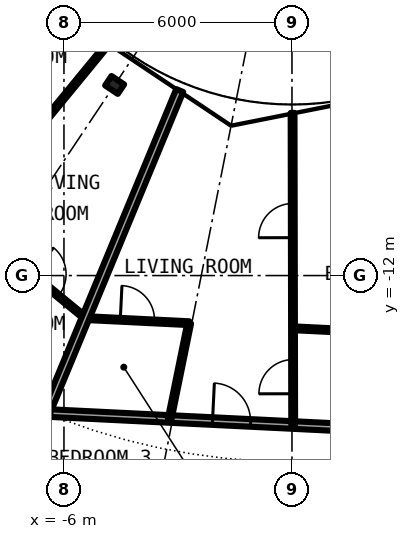
"""IFC4 building model, lengths in metres.
Left out: names, types, materials, properties, quantities, classifications, styles, units other than length and angle.
Written with IfcOpenShell. Run it as: python <this file> out.ifc"""

import sys

from ifc_helpers import new_model, si_unit, direction, frame, frame_2d, origin, origin_2d, place, context, subcontext, project, spatial, rectangle, i_section, extrude, element, fill, save


model = new_model("IFC4")
c1 = context("Model", 3, precision=1e-05, world=origin(), true_north=direction((0.0, 1.0)))
c2 = subcontext(c1, "Body", "Model", "MODEL_VIEW")
j1 = project(units=[si_unit("LENGTHUNIT", "METRE"), si_unit("PLANEANGLEUNIT", "RADIAN")], contexts=[c1])
p1 = place(None, origin())
s1 = spatial("IfcSite", under=j1, at=p1, CompositionType="ELEMENT")
p2 = place(p1, origin())
s2 = spatial("IfcBuilding", under=s1, at=p2, CompositionType="ELEMENT")
p3 = place(p2, frame((0.0, 0.0, 69.7)))
s3 = spatial("IfcBuildingStorey", under=s2, at=p3, CompositionType="ELEMENT", Elevation=69.7)
p4 = place(p3, frame((-4.667, -6.984, 0.0), z_axis=(0.0, 0.0, 1.0), x_axis=(-0.55557023302, -0.831469612303, 0.0)))
e1 = element("IfcColumn", 1, at=p4, inside=s3, PredefinedType="COLUMN", context=c2, shape_type="SweptSolid", body=[
    extrude(i_section(OverallWidth=0.3, OverallDepth=0.4, WebThickness=0.013, FlangeThickness=0.024, FilletRadius=0.027, at=origin_2d()), origin(), (0.0, 0.0, 1.0), 3.05),
])
p5 = place(p3, frame((0.0, -19.6, 0.0), z_axis=(0.0, 0.0, 1.0), x_axis=(0.956932298225, 0.290311172044, 0.0)))
e2 = element("IfcWall", 2, at=p5, inside=s3, PredefinedType="PARTITIONING", context=c2, shape_type="SweptSolid", body=[
    extrude(rectangle(XDim=11.219, YDim=0.2, at=frame_2d((5.61, 0.0))), origin(), (0.0, 0.0, 1.0), 2.38),
])
p6 = place(p5, frame((7.086, 0.0, 0.0)))
e3 = element("IfcOpeningElement", 3, at=p6, cuts=e2, PredefinedType="OPENING", context=c2, shape_type="SweptSolid", body=[
    extrude(rectangle(XDim=1.0, YDim=2.3, at=frame_2d((0.5, 1.15))), frame((0.0, 0.11, 0.0), z_axis=(0.0, -1.0, 0.0), x_axis=(1.0, 0.0, 0.0)), (0.0, 0.0, 1.0), 0.22),
])
p7 = place(p3, frame((-6.469, -15.614, 0.0), z_axis=(0.0, 0.0, 1.0), x_axis=(0.998798520108, -0.049005267363, 0.0)))
e4 = element("IfcWall", 4, at=p7, inside=s3, PredefinedType="PARTITIONING", context=c2, shape_type="SweptSolid", body=[
    extrude(rectangle(XDim=11.389, YDim=0.2, at=frame_2d((5.694, 0.0))), origin(), (0.0, 0.0, 1.0), 2.7),
])
p8 = place(p7, frame((4.383, 0.0, 0.0)))
e5 = element("IfcOpeningElement", 5, at=p8, cuts=e4, PredefinedType="OPENING", context=c2, shape_type="SweptSolid", body=[
    extrude(rectangle(XDim=1.0, YDim=2.3, at=frame_2d((0.5, 1.15))), frame((0.0, 0.11, 0.0), z_axis=(0.0, -1.0, 0.0), x_axis=(1.0, 0.0, 0.0)), (0.0, 0.0, 1.0), 0.22),
])
p9 = place(p3, frame((-7.558, -11.376, 0.0), z_axis=(0.0, 0.0, 1.0), x_axis=(0.773049907698, -0.634345205868, 0.0)))
e6 = element("IfcWall", 6, at=p9, inside=s3, PredefinedType="PARTITIONING", context=c2, shape_type="SweptSolid", body=[
    extrude(rectangle(XDim=2.748, YDim=0.1, at=frame_2d((1.374, 0.0))), origin(), (0.0, 0.0, 1.0), 2.7),
])
p10 = place(p9, frame((0.924, 0.0, 0.0)))
e7 = element("IfcOpeningElement", 7, at=p10, cuts=e6, PredefinedType="OPENING", context=c2, shape_type="SweptSolid", body=[
    extrude(rectangle(XDim=0.9, YDim=2.3, at=frame_2d((0.45, 1.15))), frame((0.0, 0.06, 0.0), z_axis=(0.0, -1.0, 0.0), x_axis=(1.0, 0.0, 0.0)), (0.0, 0.0, 1.0), 0.12),
])
p11 = place(p3, frame((-5.434, -13.119, 0.0), z_axis=(0.0, 0.0, 1.0), x_axis=(0.998796928508, -0.049037695739, 0.0)))
e8 = element("IfcWall", 8, at=p11, inside=s3, PredefinedType="PARTITIONING", context=c2, shape_type="SweptSolid", body=[
    extrude(rectangle(XDim=2.733, YDim=0.1, at=frame_2d((1.367, 0.0))), origin(), (0.0, 0.0, 1.0), 2.7),
])
p12 = place(p11, frame((0.917, 0.0, 0.0)))
e9 = element("IfcOpeningElement", 9, at=p12, cuts=e8, PredefinedType="OPENING", context=c2, shape_type="SweptSolid", body=[
    extrude(rectangle(XDim=0.9, YDim=2.3, at=frame_2d((0.45, 1.15))), frame((0.0, 0.06, 0.0), z_axis=(0.0, -1.0, 0.0), x_axis=(1.0, 0.0, 0.0)), (0.0, 0.0, 1.0), 0.12),
])
p13 = place(p3, frame((0.03, -13.387, 0.0), z_axis=(0.0, 0.0, 1.0), x_axis=(0.998798386358, -0.049007993321, 0.0)))
e10 = element("IfcWall", 10, at=p13, inside=s3, PredefinedType="PARTITIONING", context=c2, shape_type="SweptSolid", body=[
    extrude(rectangle(XDim=4.1, YDim=0.1, at=frame_2d((2.05, 0.0))), origin(), (0.0, 0.0, 1.0), 2.7),
])
p14 = place(p3, frame((-8.62, -10.504, 0.0), z_axis=(0.0, 0.0, 1.0), x_axis=(0.634539754242, 0.772890225249, 0.0)))
e11 = element("IfcWall", 11, at=p14, inside=s3, PredefinedType="PARTITIONING", context=c2, shape_type="SweptSolid", body=[
    extrude(rectangle(XDim=5.867, YDim=0.1, at=frame_2d((2.934, 0.0))), origin(), (0.0, 0.0, 1.0), 2.7),
])
p15 = place(p14, frame((2.484, 0.0, 0.0)))
e12 = element("IfcOpeningElement", 12, at=p15, cuts=e11, PredefinedType="OPENING", context=c2, shape_type="SweptSolid", body=[
    extrude(rectangle(XDim=0.9, YDim=2.3, at=frame_2d((0.45, 1.15))), frame((0.0, 0.06, 0.0), z_axis=(0.0, -1.0, 0.0), x_axis=(1.0, 0.0, 0.0)), (0.0, 0.0, 1.0), 0.12),
])
p16 = place(p3, frame((-6.467, -15.614, 0.0), z_axis=(0.0, 0.0, 1.0), x_axis=(0.382646942224, 0.923894646378, 0.0)))
e13 = element("IfcWall", 13, at=p16, inside=s3, PredefinedType="PARTITIONING", context=c2, shape_type="SweptSolid", body=[
    extrude(rectangle(XDim=9.181, YDim=0.2, at=frame_2d((4.59, 0.0))), origin(), (0.0, 0.0, 1.0), 2.7),
])
p17 = place(p3, frame((-3.218, -15.773, 0.0), z_axis=(0.0, 0.0, 1.0), x_axis=(0.199820523641, 0.979832515449, 0.0)))
e14 = element("IfcWall", 14, at=p17, inside=s3, PredefinedType="PARTITIONING", context=c2, shape_type="SweptSolid", body=[
    extrude(rectangle(XDim=2.572, YDim=0.1, at=frame_2d((1.286, 0.0))), origin(), (0.0, 0.0, 1.0), 2.7),
])
p18 = place(p3, frame((0.032, -15.933, 0.0), z_axis=(0.0, 0.0, 1.0), x_axis=(-0.0019321625, 0.999998133372, 0.0)))
e15 = element("IfcWall", 15, at=p18, inside=s3, PredefinedType="PARTITIONING", context=c2, shape_type="SweptSolid", body=[
    extrude(rectangle(XDim=8.213, YDim=0.1, at=frame_2d((4.106, 0.0))), origin(), (0.0, 0.0, 1.0), 2.7),
])
p19 = place(p18, frame((0.823, 0.0, 0.0)))
e16 = element("IfcOpeningElement", 16, at=p19, cuts=e15, PredefinedType="OPENING", context=c2, shape_type="SweptSolid", body=[
    extrude(rectangle(XDim=0.9, YDim=2.3, at=frame_2d((0.45, 1.15))), frame((0.0, 0.06, 0.0), z_axis=(0.0, -1.0, 0.0), x_axis=(1.0, 0.0, 0.0)), (0.0, 0.0, 1.0), 0.12),
])
p20 = place(p18, frame((4.93, 0.0, 0.0)))
e17 = element("IfcOpeningElement", 17, at=p20, cuts=e15, PredefinedType="OPENING", context=c2, shape_type="SweptSolid", body=[
    extrude(rectangle(XDim=0.9, YDim=2.3, at=frame_2d((0.45, 1.15))), frame((0.0, 0.06, 0.0), z_axis=(0.0, -1.0, 0.0), x_axis=(1.0, 0.0, 0.0)), (0.0, 0.0, 1.0), 0.12),
])
p21 = place(p10, origin())
e18 = element("IfcDoor", 18, at=p21, inside=s3, OperationType="SINGLE_SWING_LEFT", PredefinedType="DOOR", context=c2, shape_type="SweptSolid", body=[
    extrude(rectangle(XDim=0.9, YDim=2.3, at=frame_2d((0.45, 1.15))), frame((0.0, 0.025, 0.0), z_axis=(0.0, -1.0, 0.0), x_axis=(1.0, 0.0, 0.0)), (0.0, 0.0, 1.0), 0.05),
])
fill(e7, e18)
p22 = place(p8, origin())
e19 = element("IfcDoor", 19, at=p22, inside=s3, OperationType="SINGLE_SWING_LEFT", PredefinedType="DOOR", context=c2, shape_type="SweptSolid", body=[
    extrude(rectangle(XDim=1.0, YDim=2.3, at=frame_2d((0.5, 1.15))), frame((0.0, 0.025, 0.0), z_axis=(0.0, -1.0, 0.0), x_axis=(1.0, 0.0, 0.0)), (0.0, 0.0, 1.0), 0.05),
])
fill(e5, e19)
p23 = place(p12, origin())
e20 = element("IfcDoor", 20, at=p23, inside=s3, OperationType="SINGLE_SWING_LEFT", PredefinedType="DOOR", context=c2, shape_type="SweptSolid", body=[
    extrude(rectangle(XDim=0.9, YDim=2.3, at=frame_2d((0.45, 1.15))), frame((0.0, 0.025, 0.0), z_axis=(0.0, -1.0, 0.0), x_axis=(1.0, 0.0, 0.0)), (0.0, 0.0, 1.0), 0.05),
])
fill(e9, e20)
p24 = place(p19, origin())
e21 = element("IfcDoor", 21, at=p24, inside=s3, OperationType="SINGLE_SWING_LEFT", PredefinedType="DOOR", context=c2, shape_type="SweptSolid", body=[
    extrude(rectangle(XDim=0.9, YDim=2.3, at=frame_2d((0.45, 1.15))), frame((0.0, 0.025, 0.0), z_axis=(0.0, -1.0, 0.0), x_axis=(1.0, 0.0, 0.0)), (0.0, 0.0, 1.0), 0.05),
])
fill(e16, e21)
p25 = place(p20, origin())
e22 = element("IfcDoor", 22, at=p25, inside=s3, OperationType="SINGLE_SWING_RIGHT", PredefinedType="DOOR", context=c2, shape_type="SweptSolid", body=[
    extrude(rectangle(XDim=0.9, YDim=2.3, at=frame_2d((0.45, 1.15))), frame((0.0, 0.025, 0.0), z_axis=(0.0, -1.0, 0.0), x_axis=(1.0, 0.0, 0.0)), (0.0, 0.0, 1.0), 0.05),
])
fill(e17, e22)
save(model, sys.argv[1])
